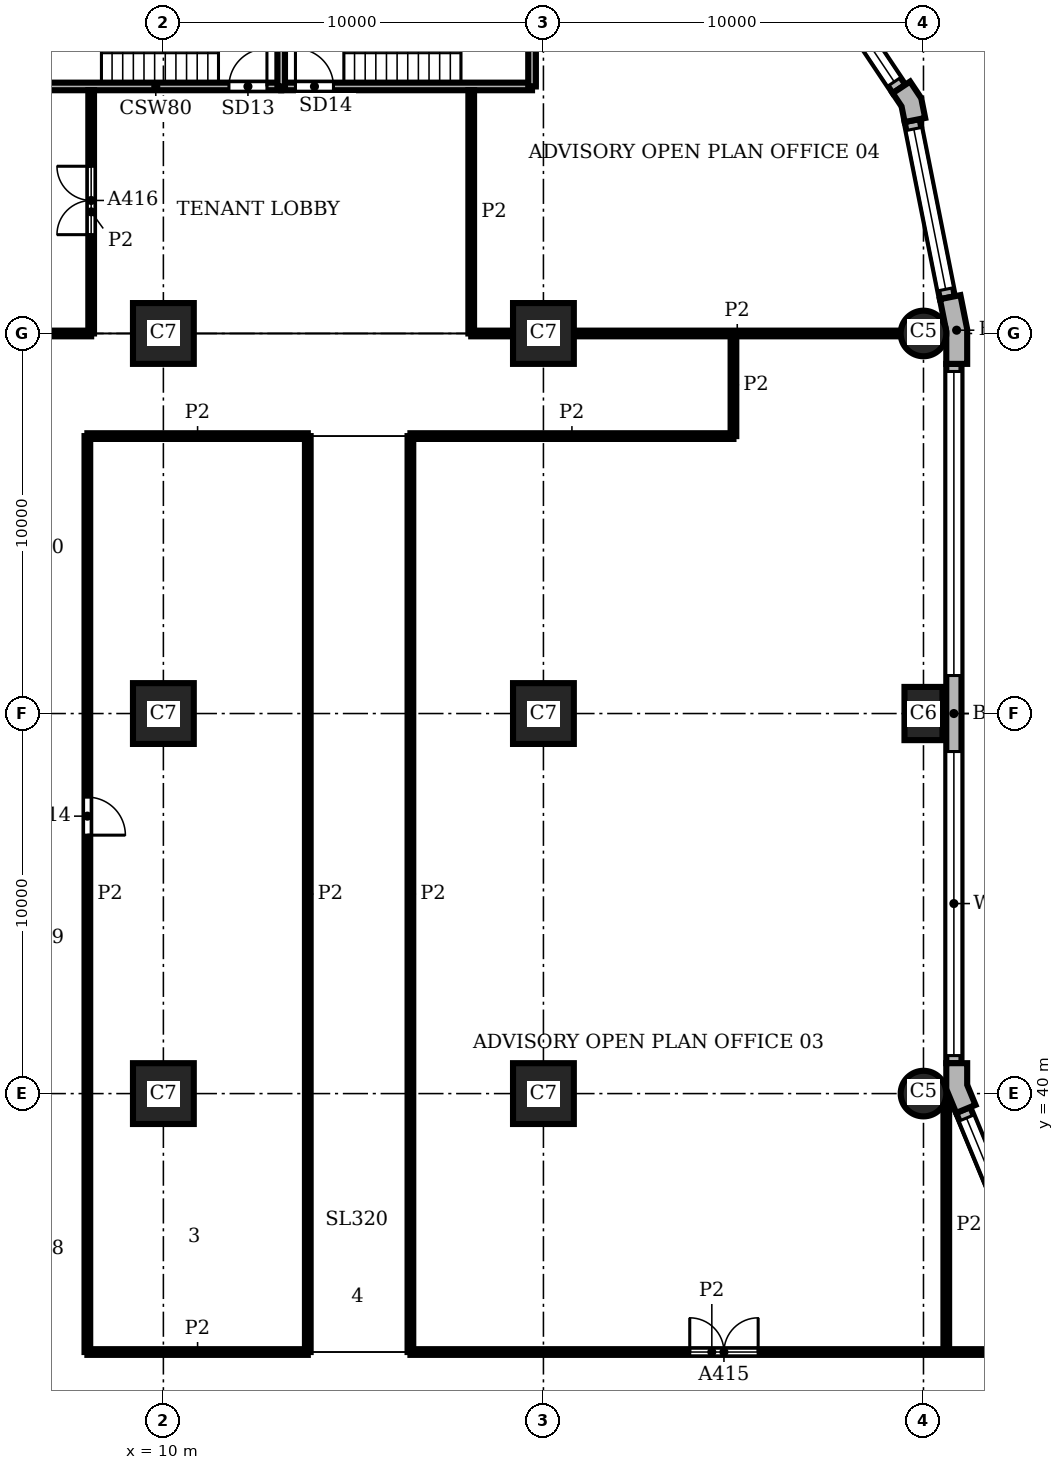
"""IFC4 building model, lengths in metres.
Left out: names, types, materials, properties, quantities, classifications, styles, units other than length and angle.
Written with IfcOpenShell. Run it as: python <this file> out.ifc"""

import sys

from ifc_helpers import new_model, si_unit, direction, frame, frame_2d, origin, origin_2d, place, context, subcontext, project, spatial, polyline, rectangle, circle, outline, extrude, element, fill, save


model = new_model("IFC4")
c1 = context("Model", 3, precision=1e-05, world=origin(), true_north=direction((0.0, 1.0)))
c2 = subcontext(c1, "Body", "Model", "MODEL_VIEW")
j1 = project(units=[si_unit("LENGTHUNIT", "METRE"), si_unit("PLANEANGLEUNIT", "RADIAN")], contexts=[c1])
p1 = place(None, origin())
s1 = spatial("IfcSite", under=j1, at=p1, CompositionType="ELEMENT")
p2 = place(p1, origin())
s2 = spatial("IfcBuilding", under=s1, at=p2, CompositionType="ELEMENT")
p3 = place(p2, frame((0.0, 0.0, 47.1)))
s3 = spatial("IfcBuildingStorey", under=s2, at=p3, CompositionType="ELEMENT", Elevation=47.1)
p4 = place(p3, frame((30.0, 40.0, 0.0), z_axis=(0.0, 0.0, 1.0), x_axis=(1.0, 0.0, 0.0)))
e1 = element("IfcColumn", 1, at=p4, inside=s3, PredefinedType="COLUMN", context=c2, shape_type="SweptSolid", body=[
    extrude(circle(Radius=0.6, at=origin_2d()), origin(), (0.0, 0.0, 1.0), 3.9),
])
p5 = place(p3, frame((30.0, 50.0, 0.0), z_axis=(0.0, 0.0, 1.0), x_axis=(0.0, 1.0, 0.0)))
e2 = element("IfcColumn", 2, at=p5, inside=s3, PredefinedType="COLUMN", context=c2, shape_type="SweptSolid", body=[
    extrude(rectangle(XDim=1.4, YDim=1.0, at=origin_2d()), origin(), (0.0, 0.0, 1.0), 3.9),
])
p6 = place(p3, frame((30.0, 60.0, 0.0), z_axis=(0.0, 0.0, 1.0), x_axis=(1.0, 0.0, 0.0)))
e3 = element("IfcColumn", 3, at=p6, inside=s3, PredefinedType="COLUMN", context=c2, shape_type="SweptSolid", body=[
    extrude(circle(Radius=0.6, at=origin_2d()), origin(), (0.0, 0.0, 1.0), 3.9),
])
for number, where, z_axis, x_axis in (
    (4, (10.0, 40.0, 0.0), (0.0, 0.0, 1.0), (1.0, 0.0, 0.0)),
    (5, (10.0, 50.0, 0.0), (0.0, 0.0, 1.0), (1.0, 0.0, 0.0)),
    (6, (10.0, 60.0, 0.0), (0.0, 0.0, 1.0), (1.0, 0.0, 0.0)),
    (7, (20.0, 40.0, 0.0), (0.0, 0.0, 1.0), (1.0, 0.0, 0.0)),
    (8, (20.0, 50.0, 0.0), (0.0, 0.0, 1.0), (1.0, 0.0, 0.0)),
    (9, (20.0, 60.0, 0.0), (0.0, 0.0, 1.0), (1.0, 0.0, 0.0)),
):
    element("IfcColumn", number, at=place(p3, frame(where, z_axis=z_axis, x_axis=x_axis)), inside=s3, PredefinedType="COLUMN", context=c2, shape_type="SweptSolid", body=[
        extrude(rectangle(XDim=1.6, YDim=1.6, at=origin_2d()), origin(), (0.0, 0.0, 1.0), 3.9),
    ])
p7 = place(p3, origin())
e10 = element("IfcWall", 10, at=p7, inside=s3, PredefinedType="SOLIDWALL", context=c2, shape_type="SweptSolid", body=[
    extrude(outline(polyline([(31.23, 39.644), (31.369, 39.701), (31.15, 40.229), (31.15, 40.8), (31.0, 40.8), (30.6, 40.8), (30.6, 40.119), (30.861, 39.49), (31.23, 39.644)])), origin(), (0.0, 0.0, 1.0), 3.9),
])
e11 = element("IfcWall", 11, at=p7, inside=s3, PredefinedType="SOLIDWALL", context=c2, shape_type="SweptSolid", body=[
    extrude(outline(polyline([(31.0, 59.2), (31.15, 59.2), (31.15, 60.113), (30.972, 61.009), (30.825, 60.98), (30.432, 60.902), (30.6, 60.059), (30.6, 59.2), (31.0, 59.2)])), origin(), (0.0, 0.0, 1.0), 3.9),
])
e12 = element("IfcWall", 12, at=p7, inside=s3, PredefinedType="SOLIDWALL", context=c2, shape_type="SweptSolid", body=[
    extrude(outline(polyline([(29.897, 65.641), (30.045, 65.67), (29.941, 66.189), (29.648, 66.629), (29.523, 66.545), (29.19, 66.323), (29.423, 65.974), (29.505, 65.563), (29.897, 65.641)])), origin(), (0.0, 0.0, 1.0), 3.9),
])
p8 = place(p3, frame((33.362, 33.974, 0.0), z_axis=(0.0, 0.0, 1.0), x_axis=(-0.382655745237, 0.923891000409, 0.0)))
e13 = element("IfcWall", 13, at=p8, inside=s3, PredefinedType="SOLIDWALL", context=c2, shape_type="SweptSolid", body=[
    extrude(rectangle(XDim=6.053, YDim=0.4, at=frame_2d((3.027, 0.0))), origin(), (0.0, 0.0, 1.0), 3.9),
])
p9 = place(p8, frame((0.227, 0.0, 0.9)))
e14 = element("IfcOpeningElement", 14, at=p9, cuts=e13, PredefinedType="OPENING", context=c2, shape_type="SweptSolid", body=[
    extrude(rectangle(XDim=5.6, YDim=2.35, at=frame_2d((2.8, 1.175))), frame((0.0, 0.21, 0.0), z_axis=(0.0, -1.0, 0.0), x_axis=(1.0, 0.0, 0.0)), (0.0, 0.0, 1.0), 0.42),
])
p10 = place(p3, frame((30.8, 40.8, 0.0), z_axis=(0.0, 0.0, 1.0), x_axis=(0.0, 1.0, 0.0)))
e15 = element("IfcWall", 15, at=p10, inside=s3, PredefinedType="SOLIDWALL", context=c2, shape_type="SweptSolid", body=[
    extrude(rectangle(XDim=18.4, YDim=0.4, at=frame_2d((9.2, 0.0))), origin(), (0.0, 0.0, 1.0), 3.9),
])
p11 = place(p10, frame((0.2, 0.0, 0.9)))
e16 = element("IfcOpeningElement", 16, at=p11, cuts=e15, PredefinedType="OPENING", context=c2, shape_type="SweptSolid", body=[
    extrude(rectangle(XDim=8.0, YDim=2.35, at=frame_2d((4.0, 1.175))), frame((0.0, 0.21, 0.0), z_axis=(0.0, -1.0, 0.0), x_axis=(1.0, 0.0, 0.0)), (0.0, 0.0, 1.0), 0.42),
])
p12 = place(p10, frame((10.2, 0.0, 0.9)))
e17 = element("IfcOpeningElement", 17, at=p12, cuts=e15, PredefinedType="OPENING", context=c2, shape_type="SweptSolid", body=[
    extrude(rectangle(XDim=8.0, YDim=2.35, at=frame_2d((4.0, 1.175))), frame((0.0, 0.21, 0.0), z_axis=(0.0, -1.0, 0.0), x_axis=(1.0, 0.0, 0.0)), (0.0, 0.0, 1.0), 0.42),
])
p13 = place(p3, frame((30.629, 60.941, 0.0), z_axis=(0.0, 0.0, 1.0), x_axis=(-0.195098533057, 0.98078364709, 0.0)))
e18 = element("IfcWall", 18, at=p13, inside=s3, PredefinedType="SOLIDWALL", context=c2, shape_type="SweptSolid", body=[
    extrude(rectangle(XDim=4.753, YDim=0.4, at=frame_2d((2.376, 0.0))), origin(), (0.0, 0.0, 1.0), 3.9),
])
p14 = place(p13, frame((0.226, 0.0, 0.9)))
e19 = element("IfcOpeningElement", 19, at=p14, cuts=e18, PredefinedType="OPENING", context=c2, shape_type="SweptSolid", body=[
    extrude(rectangle(XDim=4.3, YDim=2.35, at=frame_2d((2.15, 1.175))), frame((0.0, 0.21, 0.0), z_axis=(0.0, -1.0, 0.0), x_axis=(1.0, 0.0, 0.0)), (0.0, 0.0, 1.0), 0.42),
])
p15 = place(p3, frame((29.357, 66.434, 0.0), z_axis=(0.0, 0.0, 1.0), x_axis=(-0.555541552266, 0.831488775454, 0.0)))
e20 = element("IfcWall", 20, at=p15, inside=s3, PredefinedType="SOLIDWALL", context=c2, shape_type="SweptSolid", body=[
    extrude(rectangle(XDim=4.753, YDim=0.4, at=frame_2d((2.376, 0.0))), origin(), (0.0, 0.0, 1.0), 3.9),
])
p16 = place(p15, frame((0.226, 0.0, 0.9)))
e21 = element("IfcOpeningElement", 21, at=p16, cuts=e20, PredefinedType="OPENING", context=c2, shape_type="SweptSolid", body=[
    extrude(rectangle(XDim=4.3, YDim=2.35, at=frame_2d((2.15, 1.175))), frame((0.0, 0.21, 0.0), z_axis=(0.0, -1.0, 0.0), x_axis=(1.0, 0.0, 0.0)), (0.0, 0.0, 1.0), 0.42),
])
p17 = place(p3, frame((6.5, 66.5, 0.0), z_axis=(0.0, 0.0, 1.0), x_axis=(1.0, 0.0, 0.0)))
e22 = element("IfcWall", 22, at=p17, inside=s3, PredefinedType="SHEAR", context=c2, shape_type="SweptSolid", body=[
    extrude(rectangle(XDim=6.6, YDim=0.2, at=frame_2d((3.3, 0.0))), origin(), (0.0, 0.0, 1.0), 3.58),
])
p18 = place(p17, frame((5.225, 0.0, 0.0)))
e23 = element("IfcOpeningElement", 23, at=p18, cuts=e22, PredefinedType="OPENING", context=c2, shape_type="SweptSolid", body=[
    extrude(rectangle(XDim=1.0, YDim=2.1, at=frame_2d((0.5, 1.05))), frame((0.0, 0.11, 0.0), z_axis=(0.0, -1.0, 0.0), x_axis=(1.0, 0.0, 0.0)), (0.0, 0.0, 1.0), 0.22),
])
p19 = place(p3, frame((13.1, 66.5, 0.0), z_axis=(0.0, 0.0, 1.0), x_axis=(1.0, 0.0, 0.0)))
e24 = element("IfcWall", 24, at=p19, inside=s3, PredefinedType="SHEAR", context=c2, shape_type="SweptSolid", body=[
    extrude(rectangle(XDim=6.6, YDim=0.2, at=frame_2d((3.3, 0.0))), origin(), (0.0, 0.0, 1.0), 3.58),
])
p20 = place(p19, frame((0.375, 0.0, 0.0)))
e25 = element("IfcOpeningElement", 25, at=p20, cuts=e24, PredefinedType="OPENING", context=c2, shape_type="SweptSolid", body=[
    extrude(rectangle(XDim=1.0, YDim=2.1, at=frame_2d((0.5, 1.05))), frame((0.0, 0.11, 0.0), z_axis=(0.0, -1.0, 0.0), x_axis=(1.0, 0.0, 0.0)), (0.0, 0.0, 1.0), 0.22),
])
for number, where, z_axis, x_axis in (
    (26, (13.1, 66.5, 0.0), (0.0, 0.0, 1.0), (0.0, 1.0, 0.0)),
    (27, (19.7, 66.5, 0.0), (0.0, 0.0, 1.0), (0.0, 1.0, 0.0)),
):
    element("IfcWall", number, at=place(p3, frame(where, z_axis=z_axis, x_axis=x_axis)), inside=s3, PredefinedType="SHEAR", context=c2, shape_type="SweptSolid", body=[
        extrude(rectangle(XDim=3.3, YDim=0.2, at=frame_2d((1.65, 0.0))), origin(), (0.0, 0.0, 1.0), 3.58),
    ])
p21 = place(p3, frame((8.0, 33.2, 0.0), z_axis=(0.0, 0.0, 1.0), x_axis=(0.0, 1.0, 0.0)))
e28 = element("IfcWall", 28, at=p21, inside=s3, PredefinedType="PARTITIONING", context=c2, shape_type="SweptSolid", body=[
    extrude(rectangle(XDim=24.1, YDim=0.15, at=frame_2d((12.05, 0.0))), origin(), (0.0, 0.0, 1.0), 3.58),
])
p22 = place(p21, frame((13.6, 0.0, 0.0)))
e29 = element("IfcOpeningElement", 29, at=p22, cuts=e28, PredefinedType="OPENING", context=c2, shape_type="SweptSolid", body=[
    extrude(rectangle(XDim=1.0, YDim=2.1, at=frame_2d((0.5, 1.05))), frame((0.0, 0.085, 0.0), z_axis=(0.0, -1.0, 0.0), x_axis=(1.0, 0.0, 0.0)), (0.0, 0.0, 1.0), 0.17),
])
p23 = place(p3, frame((8.1, 60.0, 0.0), z_axis=(0.0, 0.0, 1.0), x_axis=(0.0, 1.0, 0.0)))
e30 = element("IfcWall", 30, at=p23, inside=s3, PredefinedType="PARTITIONING", context=c2, shape_type="SweptSolid", body=[
    extrude(rectangle(XDim=6.4, YDim=0.15, at=frame_2d((3.2, 0.0))), origin(), (0.0, 0.0, 1.0), 3.58),
])
p24 = place(p23, frame((2.6, 0.0, 0.0)))
e31 = element("IfcOpeningElement", 31, at=p24, cuts=e30, PredefinedType="OPENING", context=c2, shape_type="SweptSolid", body=[
    extrude(rectangle(XDim=1.8, YDim=2.1, at=frame_2d((0.9, 1.05))), frame((0.0, 0.085, 0.0), z_axis=(0.0, -1.0, 0.0), x_axis=(1.0, 0.0, 0.0)), (0.0, 0.0, 1.0), 0.17),
])
for number, where, z_axis, x_axis in (
    (32, (13.8, 33.2, 0.0), (0.0, 0.0, 1.0), (0.0, 1.0, 0.0)),
    (33, (16.5, 33.2, 0.0), (0.0, 0.0, 1.0), (0.0, 1.0, 0.0)),
):
    element("IfcWall", number, at=place(p3, frame(where, z_axis=z_axis, x_axis=x_axis)), inside=s3, PredefinedType="PARTITIONING", context=c2, shape_type="SweptSolid", body=[
        extrude(rectangle(XDim=24.1, YDim=0.15, at=frame_2d((12.05, 0.0))), origin(), (0.0, 0.0, 1.0), 3.58),
    ])
p25 = place(p3, frame((18.1, 60.0, 0.0), z_axis=(0.0, 0.0, 1.0), x_axis=(0.0, 1.0, 0.0)))
e34 = element("IfcWall", 34, at=p25, inside=s3, PredefinedType="PARTITIONING", context=c2, shape_type="SweptSolid", body=[
    extrude(rectangle(XDim=6.4, YDim=0.15, at=frame_2d((3.2, 0.0))), origin(), (0.0, 0.0, 1.0), 3.58),
])
p26 = place(p3, frame((25.0, 57.3, 0.0), z_axis=(0.0, 0.0, 1.0), x_axis=(0.0, 1.0, 0.0)))
e35 = element("IfcWall", 35, at=p26, inside=s3, PredefinedType="PARTITIONING", context=c2, shape_type="SweptSolid", body=[
    extrude(rectangle(XDim=2.7, YDim=0.15, at=frame_2d((1.35, 0.0))), origin(), (0.0, 0.0, 1.0), 3.58),
])
p27 = place(p3, frame((30.6, 33.2, 0.0), z_axis=(0.0, 0.0, 1.0), x_axis=(0.0, 1.0, 0.0)))
e36 = element("IfcWall", 36, at=p27, inside=s3, PredefinedType="PARTITIONING", context=c2, shape_type="SweptSolid", body=[
    extrude(rectangle(XDim=6.699, YDim=0.15, at=frame_2d((3.35, 0.0))), origin(), (0.0, 0.0, 1.0), 3.58),
])
p28 = place(p3, frame((8.0, 33.2, 0.0), z_axis=(0.0, 0.0, 1.0), x_axis=(1.0, 0.0, 0.0)))
e37 = element("IfcWall", 37, at=p28, inside=s3, PredefinedType="PARTITIONING", context=c2, shape_type="SweptSolid", body=[
    extrude(rectangle(XDim=5.8, YDim=0.15, at=frame_2d((2.9, 0.0))), origin(), (0.0, 0.0, 1.0), 3.58),
])
p29 = place(p3, frame((16.5, 33.2, 0.0), z_axis=(0.0, 0.0, 1.0), x_axis=(1.0, 0.0, 0.0)))
e38 = element("IfcWall", 38, at=p29, inside=s3, PredefinedType="PARTITIONING", context=c2, shape_type="SweptSolid", body=[
    extrude(rectangle(XDim=15.862, YDim=0.15, at=frame_2d((7.931, 0.0))), origin(), (0.0, 0.0, 1.0), 3.58),
])
p30 = place(p29, frame((7.35, 0.0, 0.0)))
e39 = element("IfcOpeningElement", 39, at=p30, cuts=e38, PredefinedType="OPENING", context=c2, shape_type="SweptSolid", body=[
    extrude(rectangle(XDim=1.8, YDim=2.1, at=frame_2d((0.9, 1.05))), frame((0.0, 0.085, 0.0), z_axis=(0.0, -1.0, 0.0), x_axis=(1.0, 0.0, 0.0)), (0.0, 0.0, 1.0), 0.17),
])
p31 = place(p3, frame((8.0, 57.3, 0.0), z_axis=(0.0, 0.0, 1.0), x_axis=(1.0, 0.0, 0.0)))
e40 = element("IfcWall", 40, at=p31, inside=s3, PredefinedType="PARTITIONING", context=c2, shape_type="SweptSolid", body=[
    extrude(rectangle(XDim=5.8, YDim=0.15, at=frame_2d((2.9, 0.0))), origin(), (0.0, 0.0, 1.0), 3.58),
])
p32 = place(p3, frame((16.5, 57.3, 0.0), z_axis=(0.0, 0.0, 1.0), x_axis=(1.0, 0.0, 0.0)))
e41 = element("IfcWall", 41, at=p32, inside=s3, PredefinedType="PARTITIONING", context=c2, shape_type="SweptSolid", body=[
    extrude(rectangle(XDim=8.5, YDim=0.15, at=frame_2d((4.25, 0.0))), origin(), (0.0, 0.0, 1.0), 3.58),
])
p33 = place(p3, frame((0.6, 60.0, 0.0), z_axis=(0.0, 0.0, 1.0), x_axis=(1.0, 0.0, 0.0)))
e42 = element("IfcWall", 42, at=p33, inside=s3, PredefinedType="PARTITIONING", context=c2, shape_type="SweptSolid", body=[
    extrude(rectangle(XDim=7.5, YDim=0.15, at=frame_2d((3.75, 0.0))), origin(), (0.0, 0.0, 1.0), 3.58),
])
p34 = place(p3, frame((18.1, 60.0, 0.0), z_axis=(0.0, 0.0, 1.0), x_axis=(1.0, 0.0, 0.0)))
e43 = element("IfcWall", 43, at=p34, inside=s3, PredefinedType="PARTITIONING", context=c2, shape_type="SweptSolid", body=[
    extrude(rectangle(XDim=1.1, YDim=0.15, at=frame_2d((0.55, 0.0))), origin(), (0.0, 0.0, 1.0), 3.58),
])
p35 = place(p3, frame((20.8, 60.0, 0.0), z_axis=(0.0, 0.0, 1.0), x_axis=(1.0, 0.0, 0.0)))
e44 = element("IfcWall", 44, at=p35, inside=s3, PredefinedType="PARTITIONING", context=c2, shape_type="SweptSolid", body=[
    extrude(rectangle(XDim=8.6, YDim=0.15, at=frame_2d((4.3, 0.0))), origin(), (0.0, 0.0, 1.0), 3.58),
])
p36 = place(p9, origin())
e45 = element("IfcWindow", 45, at=p36, inside=s3, PartitioningType="SINGLE_PANEL", PredefinedType="WINDOW", context=c2, shape_type="SweptSolid", body=[
    extrude(rectangle(XDim=5.6, YDim=2.35, at=frame_2d((2.8, 1.175))), frame((0.0, 0.16, 0.0), z_axis=(0.0, -1.0, 0.0), x_axis=(1.0, 0.0, 0.0)), (0.0, 0.0, 1.0), 0.06),
])
fill(e14, e45)
p37 = place(p11, origin())
e46 = element("IfcWindow", 46, at=p37, inside=s3, PartitioningType="SINGLE_PANEL", PredefinedType="WINDOW", context=c2, shape_type="SweptSolid", body=[
    extrude(rectangle(XDim=8.0, YDim=2.35, at=frame_2d((4.0, 1.175))), frame((0.0, 0.16, 0.0), z_axis=(0.0, -1.0, 0.0), x_axis=(1.0, 0.0, 0.0)), (0.0, 0.0, 1.0), 0.06),
])
fill(e16, e46)
p38 = place(p12, origin())
e47 = element("IfcWindow", 47, at=p38, inside=s3, PartitioningType="SINGLE_PANEL", PredefinedType="WINDOW", context=c2, shape_type="SweptSolid", body=[
    extrude(rectangle(XDim=8.0, YDim=2.35, at=frame_2d((4.0, 1.175))), frame((0.0, 0.16, 0.0), z_axis=(0.0, -1.0, 0.0), x_axis=(1.0, 0.0, 0.0)), (0.0, 0.0, 1.0), 0.06),
])
fill(e17, e47)
p39 = place(p14, origin())
e48 = element("IfcWindow", 48, at=p39, inside=s3, PartitioningType="SINGLE_PANEL", PredefinedType="WINDOW", context=c2, shape_type="SweptSolid", body=[
    extrude(rectangle(XDim=4.3, YDim=2.35, at=frame_2d((2.15, 1.175))), frame((0.0, 0.16, 0.0), z_axis=(0.0, -1.0, 0.0), x_axis=(1.0, 0.0, 0.0)), (0.0, 0.0, 1.0), 0.06),
])
fill(e19, e48)
p40 = place(p16, origin())
e49 = element("IfcWindow", 49, at=p40, inside=s3, PartitioningType="SINGLE_PANEL", PredefinedType="WINDOW", context=c2, shape_type="SweptSolid", body=[
    extrude(rectangle(XDim=4.3, YDim=2.35, at=frame_2d((2.15, 1.175))), frame((0.0, 0.16, 0.0), z_axis=(0.0, -1.0, 0.0), x_axis=(1.0, 0.0, 0.0)), (0.0, 0.0, 1.0), 0.06),
])
fill(e21, e49)
p41 = place(p18, origin())
e50 = element("IfcDoor", 50, at=p41, inside=s3, OperationType="SINGLE_SWING_RIGHT", PredefinedType="DOOR", context=c2, shape_type="SweptSolid", body=[
    extrude(rectangle(XDim=1.0, YDim=2.1, at=frame_2d((0.5, 1.05))), frame((0.0, 0.025, 0.0), z_axis=(0.0, -1.0, 0.0), x_axis=(1.0, 0.0, 0.0)), (0.0, 0.0, 1.0), 0.05),
])
fill(e23, e50)
p42 = place(p20, origin())
e51 = element("IfcDoor", 51, at=p42, inside=s3, OperationType="SINGLE_SWING_LEFT", PredefinedType="DOOR", context=c2, shape_type="SweptSolid", body=[
    extrude(rectangle(XDim=1.0, YDim=2.1, at=frame_2d((0.5, 1.05))), frame((0.0, 0.025, 0.0), z_axis=(0.0, -1.0, 0.0), x_axis=(1.0, 0.0, 0.0)), (0.0, 0.0, 1.0), 0.05),
])
fill(e25, e51)
p43 = place(p22, frame((1.0, 0.0, 0.0), z_axis=(0.0, 0.0, 1.0), x_axis=(-1.0, 0.0, 0.0)))
e52 = element("IfcDoor", 52, at=p43, inside=s3, OperationType="SINGLE_SWING_RIGHT", PredefinedType="DOOR", context=c2, shape_type="SweptSolid", body=[
    extrude(rectangle(XDim=1.0, YDim=2.1, at=frame_2d((0.5, 1.05))), frame((0.0, 0.025, 0.0), z_axis=(0.0, -1.0, 0.0), x_axis=(1.0, 0.0, 0.0)), (0.0, 0.0, 1.0), 0.05),
])
fill(e29, e52)
p44 = place(p30, origin())
e53 = element("IfcDoor", 53, at=p44, inside=s3, OperationType="DOUBLE_DOOR_SINGLE_SWING", PredefinedType="DOOR", context=c2, shape_type="SweptSolid", body=[
    extrude(rectangle(XDim=1.8, YDim=2.1, at=frame_2d((0.9, 1.05))), frame((0.0, 0.025, 0.0), z_axis=(0.0, -1.0, 0.0), x_axis=(1.0, 0.0, 0.0)), (0.0, 0.0, 1.0), 0.05),
])
fill(e39, e53)
p45 = place(p24, origin())
e54 = element("IfcDoor", 54, at=p45, inside=s3, OperationType="DOUBLE_DOOR_SINGLE_SWING", PredefinedType="DOOR", context=c2, shape_type="SweptSolid", body=[
    extrude(rectangle(XDim=1.8, YDim=2.1, at=frame_2d((0.9, 1.05))), frame((0.0, 0.025, 0.0), z_axis=(0.0, -1.0, 0.0), x_axis=(1.0, 0.0, 0.0)), (0.0, 0.0, 1.0), 0.05),
])
fill(e31, e54)
save(model, sys.argv[1])
